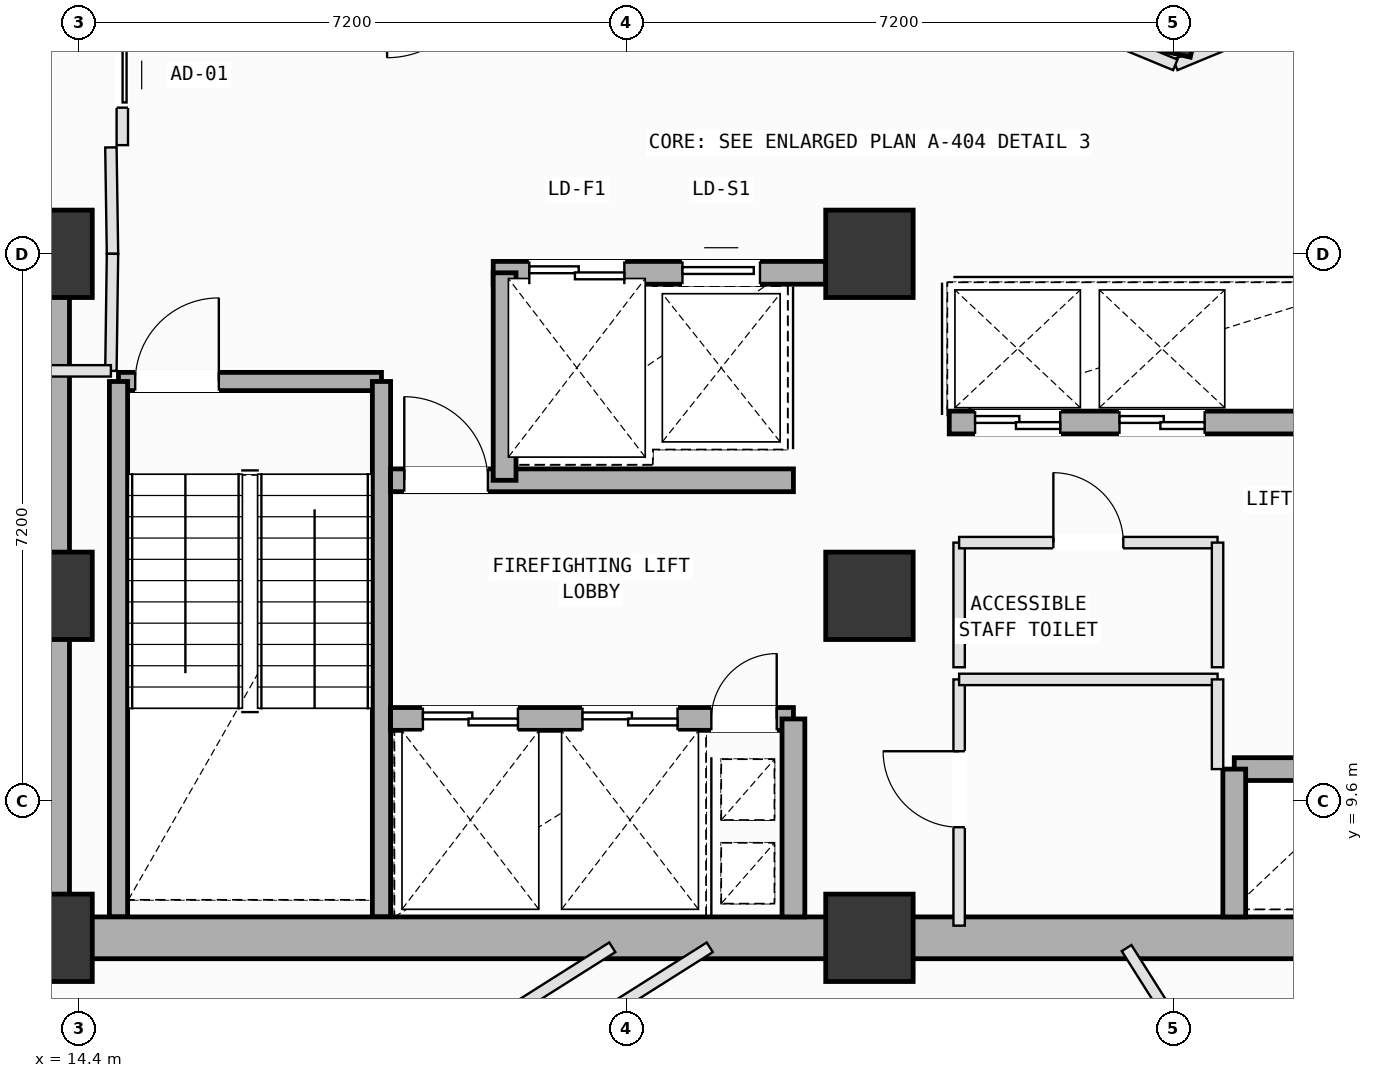
"""IFC4 building model, lengths in metres.
Left out: names, types, materials, properties, quantities, classifications, styles, units other than length and angle.
Written with IfcOpenShell. Run it as: python <this file> out.ifc"""

import sys

from ifc_helpers import new_model, si_unit, direction, frame, frame_2d, origin, origin_2d, place, context, subcontext, project, spatial, rectangle, extrude, element, fill, save


model = new_model("IFC4")
c1 = context("Model", 3, precision=1e-05, world=origin(), true_north=direction((0.0, 1.0)))
c2 = subcontext(c1, "Body", "Model", "MODEL_VIEW")
j1 = project(units=[si_unit("LENGTHUNIT", "METRE"), si_unit("PLANEANGLEUNIT", "RADIAN")], contexts=[c1])
p1 = place(None, origin())
s1 = spatial("IfcSite", under=j1, at=p1, CompositionType="ELEMENT")
p2 = place(p1, origin())
s2 = spatial("IfcBuilding", under=s1, at=p2, CompositionType="ELEMENT")
p3 = place(p2, frame((0.0, 0.0, 161.8)))
s3 = spatial("IfcBuildingStorey", under=s2, at=p3, CompositionType="ELEMENT", Elevation=161.8)
for number, where, z_axis, x_axis in (
    (1, (14.0, 7.8, 0.0), (0.0, 0.0, 1.0), (1.0, 0.0, 0.0)),
    (2, (14.0, 12.3, 0.0), (0.0, 0.0, 1.0), (1.0, 0.0, 0.0)),
    (3, (14.0, 16.8, 0.0), (0.0, 0.0, 1.0), (1.0, 0.0, 0.0)),
    (4, (24.8, 7.8, 0.0), (0.0, 0.0, 1.0), (1.0, 0.0, 0.0)),
    (5, (24.8, 12.3, 0.0), (0.0, 0.0, 1.0), (1.0, 0.0, 0.0)),
    (6, (24.8, 16.8, 0.0), (0.0, 0.0, 1.0), (1.0, 0.0, 0.0)),
):
    element("IfcColumn", number, at=place(p3, frame(where, z_axis=z_axis, x_axis=x_axis)), inside=s3, PredefinedType="COLUMN", context=c2, shape_type="SweptSolid", body=[
        extrude(rectangle(XDim=1.15, YDim=1.15, at=origin_2d()), origin(), (0.0, 0.0, 1.0), 4.0),
    ])
p4 = place(p3, frame((28.785, 20.159, 0.002), z_axis=(0.019419498398, -0.019785904028, 0.99961562667), x_axis=(-0.526167062384, 0.849951040791, 0.027045345657)))
e7 = element("IfcColumn", 7, at=p4, inside=s3, PredefinedType="COLUMN", context=c2, shape_type="SweptSolid", body=[
    extrude(rectangle(XDim=1.4, YDim=0.8, at=origin_2d()), origin(), (0.0, 0.0, 1.0), 3.998),
])
p5 = place(p3, frame((14.92, 15.12, 0.0), z_axis=(0.0, 0.0, 1.0), x_axis=(1.0, 0.0, 0.0)))
e8 = element("IfcWall", 8, at=p5, inside=s3, PredefinedType="SOLIDWALL", context=c2, shape_type="SweptSolid", body=[
    extrude(rectangle(XDim=3.46, YDim=0.24, at=frame_2d((1.73, 0.0))), origin(), (0.0, 0.0, 1.0), 3.78),
])
p6 = place(p5, frame((0.22, 0.0, 0.0)))
e9 = element("IfcOpeningElement", 9, at=p6, cuts=e8, PredefinedType="OPENING", context=c2, shape_type="SweptSolid", body=[
    extrude(rectangle(XDim=1.1, YDim=2.15, at=frame_2d((0.55, 1.075))), frame((0.0, 0.13, 0.0), z_axis=(0.0, -1.0, 0.0), x_axis=(1.0, 0.0, 0.0)), (0.0, 0.0, 1.0), 0.26),
])
for number, where, z_axis, x_axis in (
    (10, (18.38, 15.12, 0.0), (0.0, 0.0, 1.0), (0.0, -1.0, 0.0)),
    (11, (14.92, 8.075, 0.0), (0.0, 0.0, 1.0), (0.0, 1.0, 0.0)),
):
    element("IfcWall", number, at=place(p3, frame(where, z_axis=z_axis, x_axis=x_axis)), inside=s3, PredefinedType="SOLIDWALL", context=c2, shape_type="SweptSolid", body=[
        extrude(rectangle(XDim=7.045, YDim=0.24, at=frame_2d((3.522, 0.0))), origin(), (0.0, 0.0, 1.0), 3.78),
    ])
for number, where, z_axis, x_axis in (
    (12, (14.0, 7.8, 0.0), (0.0, 0.0, 1.0), (1.0, 0.0, 0.0)),
    (13, (24.8, 7.8, 0.0), (0.0, 0.0, 1.0), (1.0, 0.0, 0.0)),
):
    element("IfcWall", number, at=place(p3, frame(where, z_axis=z_axis, x_axis=x_axis)), inside=s3, PredefinedType="SHEAR", context=c2, shape_type="SweptSolid", body=[
        extrude(rectangle(XDim=10.8, YDim=0.55, at=frame_2d((5.4, 0.0))), origin(), (0.0, 0.0, 1.0), 3.78),
    ])
p7 = place(p3, frame((14.0, 16.8, 0.0), z_axis=(0.0, 0.0, 1.0), x_axis=(0.0, -1.0, 0.0)))
e14 = element("IfcWall", 14, at=p7, inside=s3, PredefinedType="SHEAR", context=c2, shape_type="SweptSolid", body=[
    extrude(rectangle(XDim=9.0, YDim=0.55, at=frame_2d((4.5, 0.0))), origin(), (0.0, 0.0, 1.0), 3.78),
])
p8 = place(p3, frame((19.85, 16.55, 0.0), z_axis=(0.0, 0.0, 1.0), x_axis=(1.0, 0.0, 0.0)))
e15 = element("IfcWall", 15, at=p8, inside=s3, PredefinedType="SOLIDWALL", context=c2, shape_type="SweptSolid", body=[
    extrude(rectangle(XDim=4.375, YDim=0.3, at=frame_2d((2.188, 0.0))), origin(), (0.0, 0.0, 1.0), 3.78),
])
p9 = place(p8, frame((0.475, 0.0, 0.0)))
e16 = element("IfcOpeningElement", 16, at=p9, cuts=e15, PredefinedType="OPENING", context=c2, shape_type="SweptSolid", body=[
    extrude(rectangle(XDim=1.25, YDim=2.18, at=frame_2d((0.625, 1.09))), frame((0.0, 0.16, 0.0), z_axis=(0.0, -1.0, 0.0), x_axis=(1.0, 0.0, 0.0)), (0.0, 0.0, 1.0), 0.32),
])
p10 = place(p8, frame((2.49, 0.0, 0.0)))
e17 = element("IfcOpeningElement", 17, at=p10, cuts=e15, PredefinedType="OPENING", context=c2, shape_type="SweptSolid", body=[
    extrude(rectangle(XDim=1.02, YDim=2.12, at=frame_2d((0.51, 1.06))), frame((0.0, 0.16, 0.0), z_axis=(0.0, -1.0, 0.0), x_axis=(1.0, 0.0, 0.0)), (0.0, 0.0, 1.0), 0.32),
])
p11 = place(p3, frame((18.5, 10.68, 0.0), z_axis=(0.0, 0.0, 1.0), x_axis=(1.0, 0.0, 0.0)))
e18 = element("IfcWall", 18, at=p11, inside=s3, PredefinedType="SOLIDWALL", context=c2, shape_type="SweptSolid", body=[
    extrude(rectangle(XDim=5.3, YDim=0.3, at=frame_2d((2.65, 0.0))), origin(), (0.0, 0.0, 1.0), 3.78),
])
p12 = place(p11, frame((4.22, 0.0, 0.0)))
e19 = element("IfcOpeningElement", 19, at=p12, cuts=e18, PredefinedType="OPENING", context=c2, shape_type="SweptSolid", body=[
    extrude(rectangle(XDim=0.86, YDim=2.06, at=frame_2d((0.43, 1.03))), frame((0.0, 0.16, 0.0), z_axis=(0.0, -1.0, 0.0), x_axis=(1.0, 0.0, 0.0)), (0.0, 0.0, 1.0), 0.32),
])
p13 = place(p11, frame((0.425, 0.0, 0.0)))
e20 = element("IfcOpeningElement", 20, at=p13, cuts=e18, PredefinedType="OPENING", context=c2, shape_type="SweptSolid", body=[
    extrude(rectangle(XDim=1.25, YDim=2.18, at=frame_2d((0.625, 1.09))), frame((0.0, 0.16, 0.0), z_axis=(0.0, -1.0, 0.0), x_axis=(1.0, 0.0, 0.0)), (0.0, 0.0, 1.0), 0.32),
])
p14 = place(p11, frame((2.525, 0.0, 0.0)))
e21 = element("IfcOpeningElement", 21, at=p14, cuts=e18, PredefinedType="OPENING", context=c2, shape_type="SweptSolid", body=[
    extrude(rectangle(XDim=1.25, YDim=2.18, at=frame_2d((0.625, 1.09))), frame((0.0, 0.16, 0.0), z_axis=(0.0, -1.0, 0.0), x_axis=(1.0, 0.0, 0.0)), (0.0, 0.0, 1.0), 0.32),
])
p15 = place(p3, frame((18.5, 13.82, 0.0), z_axis=(0.0, 0.0, 1.0), x_axis=(1.0, 0.0, 0.0)))
e22 = element("IfcWall", 22, at=p15, inside=s3, PredefinedType="SOLIDWALL", context=c2, shape_type="SweptSolid", body=[
    extrude(rectangle(XDim=5.3, YDim=0.3, at=frame_2d((2.65, 0.0))), origin(), (0.0, 0.0, 1.0), 3.78),
])
p16 = place(p15, frame((0.18, 0.0, 0.0)))
e23 = element("IfcOpeningElement", 23, at=p16, cuts=e22, PredefinedType="OPENING", context=c2, shape_type="SweptSolid", body=[
    extrude(rectangle(XDim=1.1, YDim=2.15, at=frame_2d((0.55, 1.075))), frame((0.0, 0.16, 0.0), z_axis=(0.0, -1.0, 0.0), x_axis=(1.0, 0.0, 0.0)), (0.0, 0.0, 1.0), 0.32),
])
p17 = place(p3, frame((23.8, 8.075, 0.0), z_axis=(0.0, 0.0, 1.0), x_axis=(0.0, 1.0, 0.0)))
e24 = element("IfcWall", 24, at=p17, inside=s3, PredefinedType="SOLIDWALL", context=c2, shape_type="SweptSolid", body=[
    extrude(rectangle(XDim=2.605, YDim=0.3, at=frame_2d((1.302, 0.0))), origin(), (0.0, 0.0, 1.0), 3.78),
])
p18 = place(p3, frame((20.0, 13.82, 0.0), z_axis=(0.0, 0.0, 1.0), x_axis=(0.0, 1.0, 0.0)))
e25 = element("IfcWall", 25, at=p18, inside=s3, PredefinedType="SOLIDWALL", context=c2, shape_type="SweptSolid", body=[
    extrude(rectangle(XDim=2.73, YDim=0.3, at=frame_2d((1.365, 0.0))), origin(), (0.0, 0.0, 1.0), 3.78),
])
p19 = place(p3, frame((29.6, 10.02, 0.0), z_axis=(0.0, 0.0, 1.0), x_axis=(1.0, 0.0, 0.0)))
e26 = element("IfcWall", 26, at=p19, inside=s3, PredefinedType="SOLIDWALL", context=c2, shape_type="SweptSolid", body=[
    extrude(rectangle(XDim=1.7, YDim=0.3, at=frame_2d((0.85, 0.0))), origin(), (0.0, 0.0, 1.0), 3.78),
])
p20 = place(p3, frame((29.6, 8.075, 0.0), z_axis=(0.0, 0.0, 1.0), x_axis=(0.0, 1.0, 0.0)))
e27 = element("IfcWall", 27, at=p20, inside=s3, PredefinedType="SOLIDWALL", context=c2, shape_type="SweptSolid", body=[
    extrude(rectangle(XDim=1.945, YDim=0.3, at=frame_2d((0.973, 0.0))), origin(), (0.0, 0.0, 1.0), 3.78),
])
p21 = place(p3, frame((25.85, 14.58, 0.0), z_axis=(0.0, 0.0, 1.0), x_axis=(1.0, 0.0, 0.0)))
e28 = element("IfcWall", 28, at=p21, inside=s3, PredefinedType="SOLIDWALL", context=c2, shape_type="SweptSolid", body=[
    extrude(rectangle(XDim=5.45, YDim=0.3, at=frame_2d((2.725, 0.0))), origin(), (0.0, 0.0, 1.0), 3.78),
])
p22 = place(p21, frame((0.34, 0.0, 0.0)))
e29 = element("IfcOpeningElement", 29, at=p22, cuts=e28, PredefinedType="OPENING", context=c2, shape_type="SweptSolid", body=[
    extrude(rectangle(XDim=1.12, YDim=2.15, at=frame_2d((0.56, 1.075))), frame((0.0, 0.16, 0.0), z_axis=(0.0, -1.0, 0.0), x_axis=(1.0, 0.0, 0.0)), (0.0, 0.0, 1.0), 0.32),
])
p23 = place(p21, frame((2.24, 0.0, 0.0)))
e30 = element("IfcOpeningElement", 30, at=p23, cuts=e28, PredefinedType="OPENING", context=c2, shape_type="SweptSolid", body=[
    extrude(rectangle(XDim=1.12, YDim=2.15, at=frame_2d((0.56, 1.075))), frame((0.0, 0.16, 0.0), z_axis=(0.0, -1.0, 0.0), x_axis=(1.0, 0.0, 0.0)), (0.0, 0.0, 1.0), 0.32),
])
p24 = place(p3, frame((25.98, 7.96, 0.0), z_axis=(0.0, 0.0, 1.0), x_axis=(0.0, 1.0, 0.0)))
e31 = element("IfcWall", 31, at=p24, inside=s3, PredefinedType="PARTITIONING", context=c2, shape_type="SweptSolid", body=[
    extrude(rectangle(XDim=3.24, YDim=0.15, at=frame_2d((1.62, 0.0))), origin(), (0.0, 0.0, 1.0), 3.78),
])
p25 = place(p24, frame((1.295, 0.0, 0.0)))
e32 = element("IfcOpeningElement", 32, at=p25, cuts=e31, PredefinedType="OPENING", context=c2, shape_type="SweptSolid", body=[
    extrude(rectangle(XDim=1.0, YDim=2.12, at=frame_2d((0.5, 1.06))), frame((0.0, 0.085, 0.0), z_axis=(0.0, -1.0, 0.0), x_axis=(1.0, 0.0, 0.0)), (0.0, 0.0, 1.0), 0.17),
])
p26 = place(p3, frame((25.98, 11.2, 0.0), z_axis=(0.0, 0.0, 1.0), x_axis=(1.0, 0.0, 0.0)))
e33 = element("IfcWall", 33, at=p26, inside=s3, PredefinedType="PARTITIONING", context=c2, shape_type="SweptSolid", body=[
    extrude(rectangle(XDim=3.4, YDim=0.15, at=frame_2d((1.7, 0.0))), origin(), (0.0, 0.0, 1.0), 3.78),
])
p27 = place(p3, frame((29.38, 11.2, 0.0), z_axis=(0.0, 0.0, 1.0), x_axis=(0.0, -1.0, 0.0)))
e34 = element("IfcWall", 34, at=p27, inside=s3, PredefinedType="PARTITIONING", context=c2, shape_type="SweptSolid", body=[
    extrude(rectangle(XDim=1.18, YDim=0.15, at=frame_2d((0.59, 0.0))), origin(), (0.0, 0.0, 1.0), 3.78),
])
p28 = place(p3, frame((25.98, 11.36, 0.0), z_axis=(0.0, 0.0, 1.0), x_axis=(0.0, 1.0, 0.0)))
e35 = element("IfcWall", 35, at=p28, inside=s3, PredefinedType="PARTITIONING", context=c2, shape_type="SweptSolid", body=[
    extrude(rectangle(XDim=1.64, YDim=0.15, at=frame_2d((0.82, 0.0))), origin(), (0.0, 0.0, 1.0), 3.78),
])
p29 = place(p3, frame((25.98, 13.0, 0.0), z_axis=(0.0, 0.0, 1.0), x_axis=(1.0, 0.0, 0.0)))
e36 = element("IfcWall", 36, at=p29, inside=s3, PredefinedType="PARTITIONING", context=c2, shape_type="SweptSolid", body=[
    extrude(rectangle(XDim=3.4, YDim=0.15, at=frame_2d((1.7, 0.0))), origin(), (0.0, 0.0, 1.0), 3.78),
])
p30 = place(p29, frame((1.24, 0.0, 0.0)))
e37 = element("IfcOpeningElement", 37, at=p30, cuts=e36, PredefinedType="OPENING", context=c2, shape_type="SweptSolid", body=[
    extrude(rectangle(XDim=0.92, YDim=2.1, at=frame_2d((0.46, 1.05))), frame((0.0, 0.085, 0.0), z_axis=(0.0, -1.0, 0.0), x_axis=(1.0, 0.0, 0.0)), (0.0, 0.0, 1.0), 0.17),
])
p31 = place(p3, frame((29.38, 13.0, 0.0), z_axis=(0.0, 0.0, 1.0), x_axis=(0.0, -1.0, 0.0)))
e38 = element("IfcWall", 38, at=p31, inside=s3, PredefinedType="PARTITIONING", context=c2, shape_type="SweptSolid", body=[
    extrude(rectangle(XDim=1.64, YDim=0.15, at=frame_2d((0.82, 0.0))), origin(), (0.0, 0.0, 1.0), 3.78),
])
p32 = place(p3, frame((15.59, 3.181, 0.0), z_axis=(0.0, 0.0, 1.0), x_axis=(0.845257053827, 0.53435990957, 0.0)))
e39 = element("IfcWall", 39, at=p32, inside=s3, PredefinedType="PARTITIONING", context=c2, shape_type="SweptSolid", body=[
    extrude(rectangle(XDim=8.41, YDim=0.15, at=frame_2d((4.205, 0.0))), origin(), (0.0, 0.0, 1.0), 3.78),
])
p33 = place(p3, frame((28.183, 7.665, 0.0), z_axis=(0.0, 0.0, 1.0), x_axis=(0.534336995893, -0.845271539104, 0.0)))
e40 = element("IfcWall", 40, at=p33, inside=s3, PredefinedType="PARTITIONING", context=c2, shape_type="SweptSolid", body=[
    extrude(rectangle(XDim=10.546, YDim=0.15, at=frame_2d((5.273, 0.0))), origin(), (0.0, 0.0, 1.0), 3.78),
])
p34 = place(p33, frame((5.02, 0.0, 0.0)))
e41 = element("IfcOpeningElement", 41, at=p34, cuts=e40, PredefinedType="OPENING", context=c2, shape_type="SweptSolid", body=[
    extrude(rectangle(XDim=0.86, YDim=2.06, at=frame_2d((0.43, 1.03))), frame((0.0, 0.085, 0.0), z_axis=(0.0, -1.0, 0.0), x_axis=(1.0, 0.0, 0.0)), (0.0, 0.0, 1.0), 0.17),
])
p35 = place(p3, frame((14.82, 18.2, 0.0), z_axis=(0.0, 0.0, 1.0), x_axis=(0.01499656939, -0.99988754513, 0.0)))
e42 = element("IfcWall", 42, at=p35, inside=s3, PredefinedType="PARTITIONING", context=c2, shape_type="SweptSolid", body=[
    extrude(rectangle(XDim=1.4, YDim=0.15, at=frame_2d((0.7, 0.0))), origin(), (0.0, 0.0, 1.0), 3.78),
])
p36 = place(p3, frame((14.841, 16.8, 0.0), z_axis=(0.0, 0.0, 1.0), x_axis=(-0.01363221443, -0.999907077048, 0.0)))
e43 = element("IfcWall", 43, at=p36, inside=s3, PredefinedType="PARTITIONING", context=c2, shape_type="SweptSolid", body=[
    extrude(rectangle(XDim=1.54, YDim=0.15, at=frame_2d((0.77, 0.0))), origin(), (0.0, 0.0, 1.0), 3.78),
])
p37 = place(p3, frame((14.82, 15.26, 0.0), z_axis=(0.0, 0.0, 1.0), x_axis=(-1.0, 0.0, 0.0)))
e44 = element("IfcWall", 44, at=p37, inside=s3, PredefinedType="PARTITIONING", context=c2, shape_type="SweptSolid", body=[
    extrude(rectangle(XDim=1.12, YDim=0.15, at=frame_2d((0.56, 0.0))), origin(), (0.0, 0.0, 1.0), 3.78),
])
p38 = place(p3, frame((21.417, 7.675, 0.0), z_axis=(0.0, 0.0, 1.0), x_axis=(-0.845260047402, -0.534355174268, 0.0)))
e45 = element("IfcWall", 45, at=p38, inside=s3, PredefinedType="PARTITIONING", context=c2, shape_type="SweptSolid", body=[
    extrude(rectangle(XDim=7.886, YDim=0.15, at=frame_2d((3.943, 0.0))), origin(), (0.0, 0.0, 1.0), 3.78),
])
p39 = place(p3, frame((7.249, 15.328, 0.0), z_axis=(0.0, 0.0, 1.0), x_axis=(0.845207448996, 0.534438367038, 0.0)))
e46 = element("IfcWall", 46, at=p39, inside=s3, PredefinedType="PARTITIONING", context=c2, shape_type="SweptSolid", body=[
    extrude(rectangle(XDim=9.135, YDim=0.15, at=frame_2d((4.567, 0.0))), origin(), (0.0, 0.0, 1.0), 3.78),
])
p40 = place(p3, frame((14.97, 20.21, 0.0), z_axis=(0.0, 0.0, 1.0), x_axis=(0.0, -1.0, 0.0)))
e47 = element("IfcWall", 47, at=p40, inside=s3, PredefinedType="PARTITIONING", context=c2, shape_type="SweptSolid", body=[
    extrude(rectangle(XDim=1.98, YDim=0.15, at=frame_2d((0.99, 0.0))), origin(), (0.0, 0.0, 1.0), 3.78),
])
p41 = place(p40, frame((0.627, 0.0, 0.0)))
e48 = element("IfcOpeningElement", 48, at=p41, cuts=e47, PredefinedType="OPENING", context=c2, shape_type="SweptSolid", body=[
    extrude(rectangle(XDim=0.86, YDim=2.06, at=frame_2d((0.43, 1.03))), frame((0.0, 0.085, 0.0), z_axis=(0.0, -1.0, 0.0), x_axis=(1.0, 0.0, 0.0)), (0.0, 0.0, 1.0), 0.17),
])
p42 = place(p3, frame((29.413, 19.53, 0.0), z_axis=(0.0, 0.0, 1.0), x_axis=(-0.923811477415, -0.382847690599, 0.0)))
e49 = element("IfcWall", 49, at=p42, inside=s3, PredefinedType="PARTITIONING", context=c2, shape_type="SweptSolid", body=[
    extrude(rectangle(XDim=0.638, YDim=0.15, at=frame_2d((0.319, 0.0))), origin(), (0.0, 0.0, 1.0), 3.415),
])
p43 = place(p3, frame((28.824, 19.286, 0.0), z_axis=(0.0, 0.0, 1.0), x_axis=(-0.924035461503, 0.382306769343, 0.0)))
e50 = element("IfcWall", 50, at=p43, inside=s3, PredefinedType="PARTITIONING", context=c2, shape_type="SweptSolid", body=[
    extrude(rectangle(XDim=0.639, YDim=0.15, at=frame_2d((0.319, 0.0))), origin(), (0.0, 0.0, 1.0), 3.78),
])
p44 = place(p6, origin())
e51 = element("IfcDoor", 51, at=p44, inside=s3, OperationType="SINGLE_SWING_RIGHT", PredefinedType="DOOR", context=c2, shape_type="SweptSolid", body=[
    extrude(rectangle(XDim=1.1, YDim=2.15, at=frame_2d((0.55, 1.075))), frame((0.0, 0.025, 0.0), z_axis=(0.0, -1.0, 0.0), x_axis=(1.0, 0.0, 0.0)), (0.0, 0.0, 1.0), 0.05),
])
fill(e9, e51)
p45 = place(p12, origin())
e52 = element("IfcDoor", 52, at=p45, inside=s3, OperationType="SINGLE_SWING_RIGHT", PredefinedType="DOOR", context=c2, shape_type="SweptSolid", body=[
    extrude(rectangle(XDim=0.86, YDim=2.06, at=frame_2d((0.43, 1.03))), frame((0.0, 0.025, 0.0), z_axis=(0.0, -1.0, 0.0), x_axis=(1.0, 0.0, 0.0)), (0.0, 0.0, 1.0), 0.05),
])
fill(e19, e52)
p46 = place(p16, origin())
e53 = element("IfcDoor", 53, at=p46, inside=s3, OperationType="SINGLE_SWING_LEFT", PredefinedType="DOOR", context=c2, shape_type="SweptSolid", body=[
    extrude(rectangle(XDim=1.1, YDim=2.15, at=frame_2d((0.55, 1.075))), frame((0.0, 0.025, 0.0), z_axis=(0.0, -1.0, 0.0), x_axis=(1.0, 0.0, 0.0)), (0.0, 0.0, 1.0), 0.05),
])
fill(e23, e53)
p47 = place(p13, origin())
e54 = element("IfcDoor", 54, at=p47, inside=s3, OperationType="DOUBLE_DOOR_SLIDING", PredefinedType="DOOR", context=c2, shape_type="SweptSolid", body=[
    extrude(rectangle(XDim=1.25, YDim=2.18, at=frame_2d((0.625, 1.09))), frame((0.0, 0.025, 0.0), z_axis=(0.0, -1.0, 0.0), x_axis=(1.0, 0.0, 0.0)), (0.0, 0.0, 1.0), 0.05),
])
fill(e20, e54)
p48 = place(p14, origin())
e55 = element("IfcDoor", 55, at=p48, inside=s3, OperationType="DOUBLE_DOOR_SLIDING", PredefinedType="DOOR", context=c2, shape_type="SweptSolid", body=[
    extrude(rectangle(XDim=1.25, YDim=2.18, at=frame_2d((0.625, 1.09))), frame((0.0, 0.025, 0.0), z_axis=(0.0, -1.0, 0.0), x_axis=(1.0, 0.0, 0.0)), (0.0, 0.0, 1.0), 0.05),
])
fill(e21, e55)
p49 = place(p22, origin())
e56 = element("IfcDoor", 56, at=p49, inside=s3, OperationType="DOUBLE_DOOR_SLIDING", PredefinedType="DOOR", context=c2, shape_type="SweptSolid", body=[
    extrude(rectangle(XDim=1.12, YDim=2.15, at=frame_2d((0.56, 1.075))), frame((0.0, 0.025, 0.0), z_axis=(0.0, -1.0, 0.0), x_axis=(1.0, 0.0, 0.0)), (0.0, 0.0, 1.0), 0.05),
])
fill(e29, e56)
p50 = place(p23, origin())
e57 = element("IfcDoor", 57, at=p50, inside=s3, OperationType="DOUBLE_DOOR_SLIDING", PredefinedType="DOOR", context=c2, shape_type="SweptSolid", body=[
    extrude(rectangle(XDim=1.12, YDim=2.15, at=frame_2d((0.56, 1.075))), frame((0.0, 0.025, 0.0), z_axis=(0.0, -1.0, 0.0), x_axis=(1.0, 0.0, 0.0)), (0.0, 0.0, 1.0), 0.05),
])
fill(e30, e57)
p51 = place(p9, origin())
e58 = element("IfcDoor", 58, at=p51, inside=s3, OperationType="DOUBLE_DOOR_SLIDING", PredefinedType="DOOR", context=c2, shape_type="SweptSolid", body=[
    extrude(rectangle(XDim=1.25, YDim=2.18, at=frame_2d((0.625, 1.09))), frame((0.0, 0.025, 0.0), z_axis=(0.0, -1.0, 0.0), x_axis=(1.0, 0.0, 0.0)), (0.0, 0.0, 1.0), 0.05),
])
fill(e16, e58)
p52 = place(p10, origin())
e59 = element("IfcDoor", 59, at=p52, inside=s3, OperationType="SLIDING_TO_LEFT", PredefinedType="DOOR", context=c2, shape_type="SweptSolid", body=[
    extrude(rectangle(XDim=1.02, YDim=2.12, at=frame_2d((0.51, 1.06))), frame((0.0, 0.025, 0.0), z_axis=(0.0, -1.0, 0.0), x_axis=(1.0, 0.0, 0.0)), (0.0, 0.0, 1.0), 0.05),
])
fill(e17, e59)
p53 = place(p25, origin())
e60 = element("IfcDoor", 60, at=p53, inside=s3, OperationType="SINGLE_SWING_RIGHT", PredefinedType="DOOR", context=c2, shape_type="SweptSolid", body=[
    extrude(rectangle(XDim=1.0, YDim=2.12, at=frame_2d((0.5, 1.06))), frame((0.0, 0.025, 0.0), z_axis=(0.0, -1.0, 0.0), x_axis=(1.0, 0.0, 0.0)), (0.0, 0.0, 1.0), 0.05),
])
fill(e32, e60)
p54 = place(p30, origin())
e61 = element("IfcDoor", 61, at=p54, inside=s3, OperationType="SINGLE_SWING_LEFT", PredefinedType="DOOR", context=c2, shape_type="SweptSolid", body=[
    extrude(rectangle(XDim=0.92, YDim=2.1, at=frame_2d((0.46, 1.05))), frame((0.0, 0.025, 0.0), z_axis=(0.0, -1.0, 0.0), x_axis=(1.0, 0.0, 0.0)), (0.0, 0.0, 1.0), 0.05),
])
fill(e37, e61)
p55 = place(p41, origin())
e62 = element("IfcDoor", 62, at=p55, inside=s3, OperationType="SLIDING_TO_LEFT", PredefinedType="DOOR", context=c2, shape_type="SweptSolid", body=[
    extrude(rectangle(XDim=0.86, YDim=2.06, at=frame_2d((0.43, 1.03))), frame((0.0, 0.025, 0.0), z_axis=(0.0, -1.0, 0.0), x_axis=(1.0, 0.0, 0.0)), (0.0, 0.0, 1.0), 0.05),
])
fill(e48, e62)
save(model, sys.argv[1])
